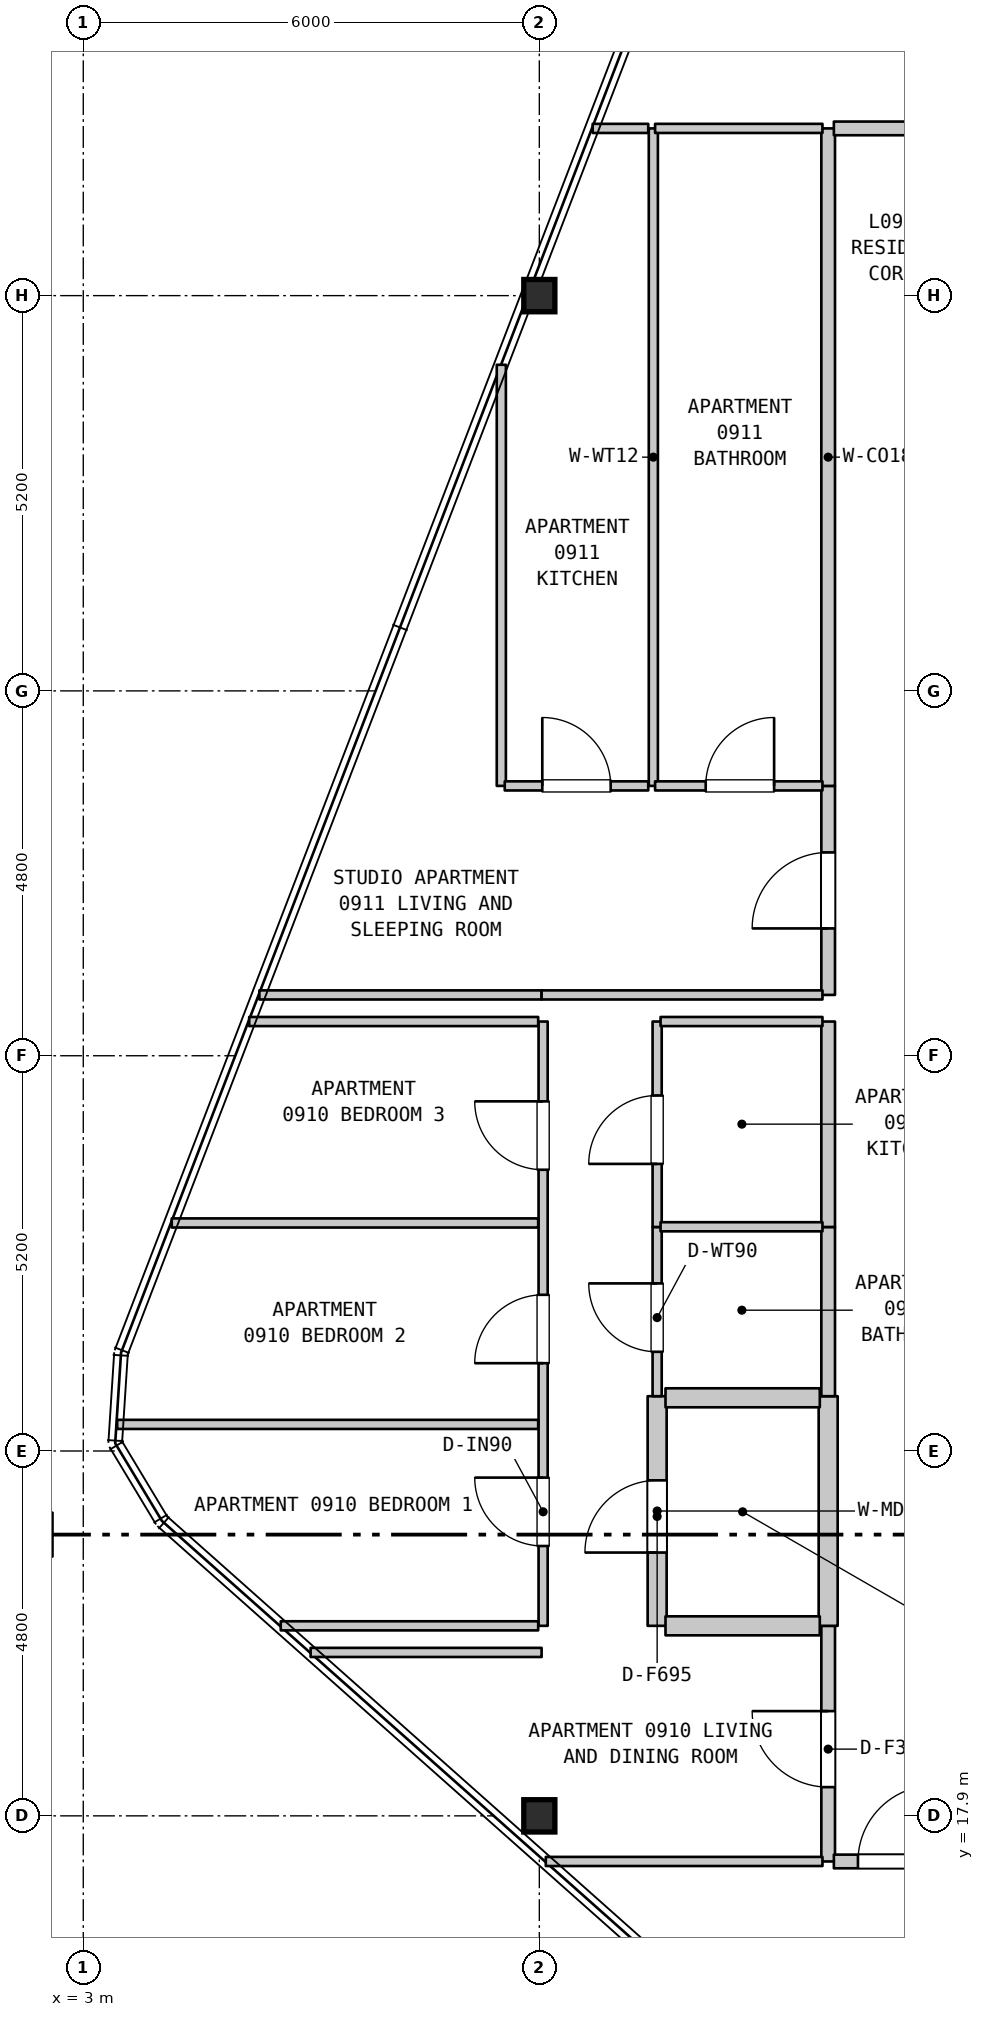
"""IFC4 building model, lengths in metres.
Left out: names, types, materials, properties, quantities, classifications, styles, units other than length and angle.
Written with IfcOpenShell. Run it as: python <this file> out.ifc"""

import sys

from ifc_helpers import new_model, si_unit, direction, frame, frame_2d, origin, origin_2d, place, context, subcontext, project, spatial, rectangle, i_section, extrude, element, fill, save


model = new_model("IFC4")
c1 = context("Model", 3, precision=1e-05, world=origin(), true_north=direction((0.0, 1.0)))
c2 = subcontext(c1, "Body", "Model", "MODEL_VIEW")
j1 = project(units=[si_unit("LENGTHUNIT", "METRE"), si_unit("PLANEANGLEUNIT", "RADIAN")], contexts=[c1])
p1 = place(None, origin())
s1 = spatial("IfcSite", under=j1, at=p1, CompositionType="ELEMENT")
p2 = place(p1, origin())
s2 = spatial("IfcBuilding", under=s1, at=p2, CompositionType="ELEMENT")
p3 = place(p2, frame((0.0, 0.0, 42.5)))
s3 = spatial("IfcBuildingStorey", under=s2, at=p3, CompositionType="ELEMENT", Elevation=42.5)
for number, where, z_axis, x_axis in (
    (1, (9.0, 17.9, 0.0), (0.0, 0.0, 1.0), (1.0, 0.0, 0.0)),
    (2, (9.0, 37.9, 0.0), (0.0, 0.0, 1.0), (1.0, 0.0, 0.0)),
):
    element("IfcColumn", number, at=place(p3, frame(where, z_axis=z_axis, x_axis=x_axis)), inside=s3, PredefinedType="COLUMN", context=c2, shape_type="SweptSolid", body=[
        extrude(i_section(OverallWidth=0.409, OverallDepth=0.425, WebThickness=0.032, FlangeThickness=0.052, FilletRadius=0.015, at=origin_2d()), origin(), (0.0, 0.0, 1.0), 3.7),
    ])
p4 = place(p3, frame((8.5, 31.45, 0.0), z_axis=(0.0, 0.0, 1.0), x_axis=(0.0, 1.0, 0.0)))
e3 = element("IfcWall", 3, at=p4, inside=s3, PredefinedType="PARTITIONING", context=c2, shape_type="SweptSolid", body=[
    extrude(rectangle(XDim=5.54, YDim=0.12, at=frame_2d((2.77, 0.0))), origin(), (0.0, 0.0, 1.0), 3.385),
])
p5 = place(p3, frame((9.05, 20.4, 0.0), z_axis=(0.0, 0.0, 1.0), x_axis=(0.0, 1.0, 0.0)))
e4 = element("IfcWall", 4, at=p5, inside=s3, PredefinedType="PARTITIONING", context=c2, shape_type="SweptSolid", body=[
    extrude(rectangle(XDim=7.95, YDim=0.12, at=frame_2d((3.975, 0.0))), origin(), (0.0, 0.0, 1.0), 2.785),
])
p6 = place(p5, frame((1.05, 0.0, 0.0)))
e5 = element("IfcOpeningElement", 5, at=p6, cuts=e4, PredefinedType="OPENING", context=c2, shape_type="SweptSolid", body=[
    extrude(rectangle(XDim=0.9, YDim=2.15, at=frame_2d((0.45, 1.075))), frame((0.0, 0.07, 0.0), z_axis=(0.0, -1.0, 0.0), x_axis=(1.0, 0.0, 0.0)), (0.0, 0.0, 1.0), 0.14),
])
p7 = place(p5, frame((3.455, 0.0, 0.0)))
e6 = element("IfcOpeningElement", 6, at=p7, cuts=e4, PredefinedType="OPENING", context=c2, shape_type="SweptSolid", body=[
    extrude(rectangle(XDim=0.9, YDim=2.15, at=frame_2d((0.45, 1.075))), frame((0.0, 0.07, 0.0), z_axis=(0.0, -1.0, 0.0), x_axis=(1.0, 0.0, 0.0)), (0.0, 0.0, 1.0), 0.14),
])
p8 = place(p5, frame((6.0, 0.0, 0.0)))
e7 = element("IfcOpeningElement", 7, at=p8, cuts=e4, PredefinedType="OPENING", context=c2, shape_type="SweptSolid", body=[
    extrude(rectangle(XDim=0.9, YDim=2.15, at=frame_2d((0.45, 1.075))), frame((0.0, 0.07, 0.0), z_axis=(0.0, -1.0, 0.0), x_axis=(1.0, 0.0, 0.0)), (0.0, 0.0, 1.0), 0.14),
])
p9 = place(p3, frame((10.5, 31.45, 0.0), z_axis=(0.0, 0.0, 1.0), x_axis=(0.0, 1.0, 0.0)))
e8 = element("IfcWall", 8, at=p9, inside=s3, PredefinedType="PARTITIONING", context=c2, shape_type="SweptSolid", body=[
    extrude(rectangle(XDim=8.65, YDim=0.12, at=frame_2d((4.325, 0.0))), origin(), (0.0, 0.0, 1.0), 3.385),
])
p10 = place(p3, frame((10.55, 20.4, 0.0), z_axis=(0.0, 0.0, 1.0), x_axis=(0.0, 1.0, 0.0)))
e9 = element("IfcWall", 9, at=p10, inside=s3, PredefinedType="STANDARD", context=c2, shape_type="SweptSolid", body=[
    extrude(rectangle(XDim=3.021, YDim=0.25, at=frame_2d((1.51, 0.0))), origin(), (0.0, 0.0, 1.0), 3.385),
])
p11 = place(p10, frame((0.964, 0.0, 0.0)))
e10 = element("IfcOpeningElement", 10, at=p11, cuts=e9, PredefinedType="OPENING", context=c2, shape_type="SweptSolid", body=[
    extrude(rectangle(XDim=0.95, YDim=2.15, at=frame_2d((0.475, 1.075))), frame((0.0, 0.135, 0.0), z_axis=(0.0, -1.0, 0.0), x_axis=(1.0, 0.0, 0.0)), (0.0, 0.0, 1.0), 0.27),
])
p12 = place(p3, frame((10.55, 23.421, 0.0), z_axis=(0.0, 0.0, 1.0), x_axis=(0.0, 1.0, 0.0)))
e11 = element("IfcWall", 11, at=p12, inside=s3, PredefinedType="PARTITIONING", context=c2, shape_type="SweptSolid", body=[
    extrude(rectangle(XDim=2.226, YDim=0.12, at=frame_2d((1.113, 0.0))), origin(), (0.0, 0.0, 1.0), 3.385),
])
p13 = place(p12, frame((0.584, 0.0, 0.0)))
e12 = element("IfcOpeningElement", 12, at=p13, cuts=e11, PredefinedType="OPENING", context=c2, shape_type="SweptSolid", body=[
    extrude(rectangle(XDim=0.9, YDim=2.1, at=frame_2d((0.45, 1.05))), frame((0.0, 0.07, 0.0), z_axis=(0.0, -1.0, 0.0), x_axis=(1.0, 0.0, 0.0)), (0.0, 0.0, 1.0), 0.14),
])
p14 = place(p3, frame((10.55, 25.647, 0.0), z_axis=(0.0, 0.0, 1.0), x_axis=(0.0, 1.0, 0.0)))
e13 = element("IfcWall", 13, at=p14, inside=s3, PredefinedType="PARTITIONING", context=c2, shape_type="SweptSolid", body=[
    extrude(rectangle(XDim=2.703, YDim=0.12, at=frame_2d((1.352, 0.0))), origin(), (0.0, 0.0, 1.0), 3.385),
])
p15 = place(p14, frame((0.83, 0.0, 0.0)))
e14 = element("IfcOpeningElement", 14, at=p15, cuts=e13, PredefinedType="OPENING", context=c2, shape_type="SweptSolid", body=[
    extrude(rectangle(XDim=0.9, YDim=2.15, at=frame_2d((0.45, 1.075))), frame((0.0, 0.07, 0.0), z_axis=(0.0, -1.0, 0.0), x_axis=(1.0, 0.0, 0.0)), (0.0, 0.0, 1.0), 0.14),
])
p16 = place(p3, frame((12.8, 17.3, 0.0), z_axis=(0.0, 0.0, 1.0), x_axis=(0.0, 1.0, 0.0)))
e15 = element("IfcWall", 15, at=p16, inside=s3, PredefinedType="STANDARD", context=c2, shape_type="SweptSolid", body=[
    extrude(rectangle(XDim=3.1, YDim=0.18, at=frame_2d((1.55, 0.0))), origin(), (0.0, 0.0, 1.0), 3.385),
])
p17 = place(p16, frame((0.978, 0.0, 0.0)))
e16 = element("IfcOpeningElement", 16, at=p17, cuts=e15, PredefinedType="OPENING", context=c2, shape_type="SweptSolid", body=[
    extrude(rectangle(XDim=1.0, YDim=2.15, at=frame_2d((0.5, 1.075))), frame((0.0, 0.1, 0.0), z_axis=(0.0, -1.0, 0.0), x_axis=(1.0, 0.0, 0.0)), (0.0, 0.0, 1.0), 0.2),
])
p18 = place(p3, frame((12.8, 20.4, 0.0), z_axis=(0.0, 0.0, 1.0), x_axis=(0.0, 1.0, 0.0)))
e17 = element("IfcWall", 17, at=p18, inside=s3, PredefinedType="STANDARD", context=c2, shape_type="SweptSolid", body=[
    extrude(rectangle(XDim=3.021, YDim=0.25, at=frame_2d((1.51, 0.0))), origin(), (0.0, 0.0, 1.0), 3.385),
])
p19 = place(p3, frame((12.8, 23.421, 0.0), z_axis=(0.0, 0.0, 1.0), x_axis=(0.0, 1.0, 0.0)))
e18 = element("IfcWall", 18, at=p19, inside=s3, PredefinedType="STANDARD", context=c2, shape_type="SweptSolid", body=[
    extrude(rectangle(XDim=2.226, YDim=0.18, at=frame_2d((1.113, 0.0))), origin(), (0.0, 0.0, 1.0), 3.385),
])
p20 = place(p3, frame((12.8, 25.647, 0.0), z_axis=(0.0, 0.0, 1.0), x_axis=(0.0, 1.0, 0.0)))
e19 = element("IfcWall", 19, at=p20, inside=s3, PredefinedType="STANDARD", context=c2, shape_type="SweptSolid", body=[
    extrude(rectangle(XDim=2.703, YDim=0.18, at=frame_2d((1.352, 0.0))), origin(), (0.0, 0.0, 1.0), 3.385),
])
p21 = place(p3, frame((12.8, 28.7, 0.0), z_axis=(0.0, 0.0, 1.0), x_axis=(0.0, 1.0, 0.0)))
e20 = element("IfcWall", 20, at=p21, inside=s3, PredefinedType="STANDARD", context=c2, shape_type="SweptSolid", body=[
    extrude(rectangle(XDim=2.75, YDim=0.18, at=frame_2d((1.375, 0.0))), origin(), (0.0, 0.0, 1.0), 3.385),
])
p22 = place(p21, frame((0.875, 0.0, 0.0)))
e21 = element("IfcOpeningElement", 21, at=p22, cuts=e20, PredefinedType="OPENING", context=c2, shape_type="SweptSolid", body=[
    extrude(rectangle(XDim=1.0, YDim=2.15, at=frame_2d((0.5, 1.075))), frame((0.0, 0.1, 0.0), z_axis=(0.0, -1.0, 0.0), x_axis=(1.0, 0.0, 0.0)), (0.0, 0.0, 1.0), 0.2),
])
p23 = place(p3, frame((12.8, 31.45, 0.0), z_axis=(0.0, 0.0, 1.0), x_axis=(0.0, 1.0, 0.0)))
e22 = element("IfcWall", 22, at=p23, inside=s3, PredefinedType="STANDARD", context=c2, shape_type="SweptSolid", body=[
    extrude(rectangle(XDim=8.65, YDim=0.18, at=frame_2d((4.325, 0.0))), origin(), (0.0, 0.0, 1.0), 3.385),
])
p24 = place(p3, frame((9.085, 17.3, 0.0), z_axis=(0.0, 0.0, 1.0), x_axis=(1.0, 0.0, 0.0)))
e23 = element("IfcWall", 23, at=p24, inside=s3, PredefinedType="PARTITIONING", context=c2, shape_type="SweptSolid", body=[
    extrude(rectangle(XDim=3.64, YDim=0.12, at=frame_2d((1.82, 0.0))), origin(), (0.0, 0.0, 1.0), 3.385),
])
p25 = place(p3, frame((12.875, 17.3, 0.0), z_axis=(0.0, 0.0, 1.0), x_axis=(1.0, 0.0, 0.0)))
e24 = element("IfcWall", 24, at=p25, inside=s3, PredefinedType="STANDARD", context=c2, shape_type="SweptSolid", body=[
    extrude(rectangle(XDim=3.78, YDim=0.18, at=frame_2d((1.89, 0.0))), origin(), (0.0, 0.0, 1.0), 3.385),
])
p26 = place(p25, frame((0.317, 0.0, 0.0)))
e25 = element("IfcOpeningElement", 25, at=p26, cuts=e24, PredefinedType="OPENING", context=c2, shape_type="SweptSolid", body=[
    extrude(rectangle(XDim=1.0, YDim=2.15, at=frame_2d((0.5, 1.075))), frame((0.0, 0.1, 0.0), z_axis=(0.0, -1.0, 0.0), x_axis=(1.0, 0.0, 0.0)), (0.0, 0.0, 1.0), 0.2),
])
p27 = place(p3, frame((5.991, 20.05, 0.0), z_axis=(0.0, 0.0, 1.0), x_axis=(1.0, 0.0, 0.0)))
e26 = element("IfcWall", 26, at=p27, inside=s3, PredefinedType="PARTITIONING", context=c2, shape_type="SweptSolid", body=[
    extrude(rectangle(XDim=3.039, YDim=0.12, at=frame_2d((1.52, 0.0))), origin(), (0.0, 0.0, 1.0), 3.385),
])
p28 = place(p3, frame((5.598, 20.4, 0.0), z_axis=(0.0, 0.0, 1.0), x_axis=(1.0, 0.0, 0.0)))
e27 = element("IfcWall", 27, at=p28, inside=s3, PredefinedType="PARTITIONING", context=c2, shape_type="SweptSolid", body=[
    extrude(rectangle(XDim=3.387, YDim=0.12, at=frame_2d((1.694, 0.0))), origin(), (0.0, 0.0, 1.0), 3.385),
])
p29 = place(p3, frame((10.66, 20.4, 0.0), z_axis=(0.0, 0.0, 1.0), x_axis=(1.0, 0.0, 0.0)))
e28 = element("IfcWall", 28, at=p29, inside=s3, PredefinedType="STANDARD", context=c2, shape_type="SweptSolid", body=[
    extrude(rectangle(XDim=2.03, YDim=0.25, at=frame_2d((1.015, 0.0))), origin(), (0.0, 0.0, 1.0), 3.385),
])
p30 = place(p3, frame((3.446, 23.05, 0.0), z_axis=(0.0, 0.0, 1.0), x_axis=(1.0, 0.0, 0.0)))
e29 = element("IfcWall", 29, at=p30, inside=s3, PredefinedType="PARTITIONING", context=c2, shape_type="SweptSolid", body=[
    extrude(rectangle(XDim=5.539, YDim=0.12, at=frame_2d((2.77, 0.0))), origin(), (0.0, 0.0, 1.0), 3.385),
])
p31 = place(p3, frame((10.66, 23.4, 0.0), z_axis=(0.0, 0.0, 1.0), x_axis=(1.0, 0.0, 0.0)))
e30 = element("IfcWall", 30, at=p31, inside=s3, PredefinedType="STANDARD", context=c2, shape_type="SweptSolid", body=[
    extrude(rectangle(XDim=2.03, YDim=0.25, at=frame_2d((1.015, 0.0))), origin(), (0.0, 0.0, 1.0), 3.385),
])
p32 = place(p3, frame((10.595, 25.65, 0.0), z_axis=(0.0, 0.0, 1.0), x_axis=(1.0, 0.0, 0.0)))
e31 = element("IfcWall", 31, at=p32, inside=s3, PredefinedType="PARTITIONING", context=c2, shape_type="SweptSolid", body=[
    extrude(rectangle(XDim=2.13, YDim=0.12, at=frame_2d((1.065, 0.0))), origin(), (0.0, 0.0, 1.0), 3.385),
])
p33 = place(p3, frame((4.164, 25.7, 0.0), z_axis=(0.0, 0.0, 1.0), x_axis=(1.0, 0.0, 0.0)))
e32 = element("IfcWall", 32, at=p33, inside=s3, PredefinedType="PARTITIONING", context=c2, shape_type="SweptSolid", body=[
    extrude(rectangle(XDim=4.821, YDim=0.12, at=frame_2d((2.411, 0.0))), origin(), (0.0, 0.0, 1.0), 3.385),
])
p34 = place(p3, frame((5.183, 28.35, 0.0), z_axis=(0.0, 0.0, 1.0), x_axis=(1.0, 0.0, 0.0)))
e33 = element("IfcWall", 33, at=p34, inside=s3, PredefinedType="PARTITIONING", context=c2, shape_type="SweptSolid", body=[
    extrude(rectangle(XDim=3.802, YDim=0.12, at=frame_2d((1.901, 0.0))), origin(), (0.0, 0.0, 1.0), 3.385),
])
p35 = place(p3, frame((10.595, 28.35, 0.0), z_axis=(0.0, 0.0, 1.0), x_axis=(1.0, 0.0, 0.0)))
e34 = element("IfcWall", 34, at=p35, inside=s3, PredefinedType="PARTITIONING", context=c2, shape_type="SweptSolid", body=[
    extrude(rectangle(XDim=2.13, YDim=0.12, at=frame_2d((1.065, 0.0))), origin(), (0.0, 0.0, 1.0), 3.385),
])
p36 = place(p3, frame((5.317, 28.7, 0.0), z_axis=(0.0, 0.0, 1.0), x_axis=(1.0, 0.0, 0.0)))
e35 = element("IfcWall", 35, at=p36, inside=s3, PredefinedType="PARTITIONING", context=c2, shape_type="SweptSolid", body=[
    extrude(rectangle(XDim=3.713, YDim=0.12, at=frame_2d((1.856, 0.0))), origin(), (0.0, 0.0, 1.0), 3.385),
])
p37 = place(p3, frame((9.03, 28.7, 0.0), z_axis=(0.0, 0.0, 1.0), x_axis=(1.0, 0.0, 0.0)))
e36 = element("IfcWall", 36, at=p37, inside=s3, PredefinedType="PARTITIONING", context=c2, shape_type="SweptSolid", body=[
    extrude(rectangle(XDim=3.695, YDim=0.12, at=frame_2d((1.848, 0.0))), origin(), (0.0, 0.0, 1.0), 3.385),
])
p38 = place(p3, frame((8.545, 31.45, 0.0), z_axis=(0.0, 0.0, 1.0), x_axis=(1.0, 0.0, 0.0)))
e37 = element("IfcWall", 37, at=p38, inside=s3, PredefinedType="PARTITIONING", context=c2, shape_type="SweptSolid", body=[
    extrude(rectangle(XDim=1.888, YDim=0.12, at=frame_2d((0.944, 0.0))), origin(), (0.0, 0.0, 1.0), 3.385),
])
p39 = place(p38, frame((0.494, 0.0, 0.0)))
e38 = element("IfcOpeningElement", 38, at=p39, cuts=e37, PredefinedType="OPENING", context=c2, shape_type="SweptSolid", body=[
    extrude(rectangle(XDim=0.9, YDim=2.15, at=frame_2d((0.45, 1.075))), frame((0.0, 0.07, 0.0), z_axis=(0.0, -1.0, 0.0), x_axis=(1.0, 0.0, 0.0)), (0.0, 0.0, 1.0), 0.14),
])
p40 = place(p3, frame((10.523, 31.45, 0.0), z_axis=(0.0, 0.0, 1.0), x_axis=(1.0, 0.0, 0.0)))
e39 = element("IfcWall", 39, at=p40, inside=s3, PredefinedType="PARTITIONING", context=c2, shape_type="SweptSolid", body=[
    extrude(rectangle(XDim=2.202, YDim=0.12, at=frame_2d((1.101, 0.0))), origin(), (0.0, 0.0, 1.0), 3.385),
])
p41 = place(p40, frame((0.666, 0.0, 0.0)))
e40 = element("IfcOpeningElement", 40, at=p41, cuts=e39, PredefinedType="OPENING", context=c2, shape_type="SweptSolid", body=[
    extrude(rectangle(XDim=0.9, YDim=2.1, at=frame_2d((0.45, 1.05))), frame((0.0, 0.07, 0.0), z_axis=(0.0, -1.0, 0.0), x_axis=(1.0, 0.0, 0.0)), (0.0, 0.0, 1.0), 0.14),
])
p42 = place(p3, frame((9.702, 40.1, 0.0), z_axis=(0.0, 0.0, 1.0), x_axis=(1.0, 0.0, 0.0)))
e41 = element("IfcWall", 41, at=p42, inside=s3, PredefinedType="PARTITIONING", context=c2, shape_type="SweptSolid", body=[
    extrude(rectangle(XDim=0.731, YDim=0.12, at=frame_2d((0.366, 0.0))), origin(), (0.0, 0.0, 1.0), 3.385),
])
p43 = place(p3, frame((10.523, 40.1, 0.0), z_axis=(0.0, 0.0, 1.0), x_axis=(1.0, 0.0, 0.0)))
e42 = element("IfcWall", 42, at=p43, inside=s3, PredefinedType="PARTITIONING", context=c2, shape_type="SweptSolid", body=[
    extrude(rectangle(XDim=2.202, YDim=0.12, at=frame_2d((1.101, 0.0))), origin(), (0.0, 0.0, 1.0), 3.385),
])
p44 = place(p3, frame((12.875, 40.1, 0.0), z_axis=(0.0, 0.0, 1.0), x_axis=(1.0, 0.0, 0.0)))
e43 = element("IfcWall", 43, at=p44, inside=s3, PredefinedType="STANDARD", context=c2, shape_type="SweptSolid", body=[
    extrude(rectangle(XDim=5.03, YDim=0.18, at=frame_2d((2.515, 0.0))), origin(), (0.0, 0.0, 1.0), 3.385),
])
p45 = place(p44, frame((2.0, 0.0, 0.0)))
e44 = element("IfcOpeningElement", 44, at=p45, cuts=e43, PredefinedType="OPENING", context=c2, shape_type="SweptSolid", body=[
    extrude(rectangle(XDim=1.0, YDim=2.15, at=frame_2d((0.5, 1.075))), frame((0.0, 0.1, 0.0), z_axis=(0.0, -1.0, 0.0), x_axis=(1.0, 0.0, 0.0)), (0.0, 0.0, 1.0), 0.2),
])
p46 = place(p6, origin())
e45 = element("IfcDoor", 45, at=p46, inside=s3, OperationType="SINGLE_SWING_RIGHT", PredefinedType="DOOR", context=c2, shape_type="SweptSolid", body=[
    extrude(rectangle(XDim=0.9, YDim=2.15, at=frame_2d((0.45, 1.075))), frame((0.0, 0.025, 0.0), z_axis=(0.0, -1.0, 0.0), x_axis=(1.0, 0.0, 0.0)), (0.0, 0.0, 1.0), 0.05),
])
fill(e5, e45)
p47 = place(p7, origin())
e46 = element("IfcDoor", 46, at=p47, inside=s3, OperationType="SINGLE_SWING_LEFT", PredefinedType="DOOR", context=c2, shape_type="SweptSolid", body=[
    extrude(rectangle(XDim=0.9, YDim=2.15, at=frame_2d((0.45, 1.075))), frame((0.0, 0.025, 0.0), z_axis=(0.0, -1.0, 0.0), x_axis=(1.0, 0.0, 0.0)), (0.0, 0.0, 1.0), 0.05),
])
fill(e6, e46)
p48 = place(p8, origin())
e47 = element("IfcDoor", 47, at=p48, inside=s3, OperationType="SINGLE_SWING_RIGHT", PredefinedType="DOOR", context=c2, shape_type="SweptSolid", body=[
    extrude(rectangle(XDim=0.9, YDim=2.15, at=frame_2d((0.45, 1.075))), frame((0.0, 0.025, 0.0), z_axis=(0.0, -1.0, 0.0), x_axis=(1.0, 0.0, 0.0)), (0.0, 0.0, 1.0), 0.05),
])
fill(e7, e47)
p49 = place(p11, origin())
e48 = element("IfcDoor", 48, at=p49, inside=s3, OperationType="SINGLE_SWING_LEFT", PredefinedType="DOOR", context=c2, shape_type="SweptSolid", body=[
    extrude(rectangle(XDim=0.95, YDim=2.15, at=frame_2d((0.475, 1.075))), frame((0.0, 0.025, 0.0), z_axis=(0.0, -1.0, 0.0), x_axis=(1.0, 0.0, 0.0)), (0.0, 0.0, 1.0), 0.05),
])
fill(e10, e48)
p50 = place(p13, origin())
e49 = element("IfcDoor", 49, at=p50, inside=s3, OperationType="SINGLE_SWING_RIGHT", PredefinedType="DOOR", context=c2, shape_type="SweptSolid", body=[
    extrude(rectangle(XDim=0.9, YDim=2.1, at=frame_2d((0.45, 1.05))), frame((0.0, 0.025, 0.0), z_axis=(0.0, -1.0, 0.0), x_axis=(1.0, 0.0, 0.0)), (0.0, 0.0, 1.0), 0.05),
])
fill(e12, e49)
p51 = place(p15, origin())
e50 = element("IfcDoor", 50, at=p51, inside=s3, OperationType="SINGLE_SWING_LEFT", PredefinedType="DOOR", context=c2, shape_type="SweptSolid", body=[
    extrude(rectangle(XDim=0.9, YDim=2.15, at=frame_2d((0.45, 1.075))), frame((0.0, 0.025, 0.0), z_axis=(0.0, -1.0, 0.0), x_axis=(1.0, 0.0, 0.0)), (0.0, 0.0, 1.0), 0.05),
])
fill(e14, e50)
p52 = place(p17, origin())
e51 = element("IfcDoor", 51, at=p52, inside=s3, OperationType="SINGLE_SWING_RIGHT", PredefinedType="DOOR", context=c2, shape_type="SweptSolid", body=[
    extrude(rectangle(XDim=1.0, YDim=2.15, at=frame_2d((0.5, 1.075))), frame((0.0, 0.025, 0.0), z_axis=(0.0, -1.0, 0.0), x_axis=(1.0, 0.0, 0.0)), (0.0, 0.0, 1.0), 0.05),
])
fill(e16, e51)
p53 = place(p22, origin())
e52 = element("IfcDoor", 52, at=p53, inside=s3, OperationType="SINGLE_SWING_LEFT", PredefinedType="DOOR", context=c2, shape_type="SweptSolid", body=[
    extrude(rectangle(XDim=1.0, YDim=2.15, at=frame_2d((0.5, 1.075))), frame((0.0, 0.025, 0.0), z_axis=(0.0, -1.0, 0.0), x_axis=(1.0, 0.0, 0.0)), (0.0, 0.0, 1.0), 0.05),
])
fill(e21, e52)
p54 = place(p26, origin())
e53 = element("IfcDoor", 53, at=p54, inside=s3, OperationType="SINGLE_SWING_RIGHT", PredefinedType="DOOR", context=c2, shape_type="SweptSolid", body=[
    extrude(rectangle(XDim=1.0, YDim=2.15, at=frame_2d((0.5, 1.075))), frame((0.0, 0.025, 0.0), z_axis=(0.0, -1.0, 0.0), x_axis=(1.0, 0.0, 0.0)), (0.0, 0.0, 1.0), 0.05),
])
fill(e25, e53)
p55 = place(p39, origin())
e54 = element("IfcDoor", 54, at=p55, inside=s3, OperationType="SINGLE_SWING_LEFT", PredefinedType="DOOR", context=c2, shape_type="SweptSolid", body=[
    extrude(rectangle(XDim=0.9, YDim=2.15, at=frame_2d((0.45, 1.075))), frame((0.0, 0.025, 0.0), z_axis=(0.0, -1.0, 0.0), x_axis=(1.0, 0.0, 0.0)), (0.0, 0.0, 1.0), 0.05),
])
fill(e38, e54)
p56 = place(p41, origin())
e55 = element("IfcDoor", 55, at=p56, inside=s3, OperationType="SINGLE_SWING_RIGHT", PredefinedType="DOOR", context=c2, shape_type="SweptSolid", body=[
    extrude(rectangle(XDim=0.9, YDim=2.1, at=frame_2d((0.45, 1.05))), frame((0.0, 0.025, 0.0), z_axis=(0.0, -1.0, 0.0), x_axis=(1.0, 0.0, 0.0)), (0.0, 0.0, 1.0), 0.05),
])
fill(e40, e55)
save(model, sys.argv[1])
